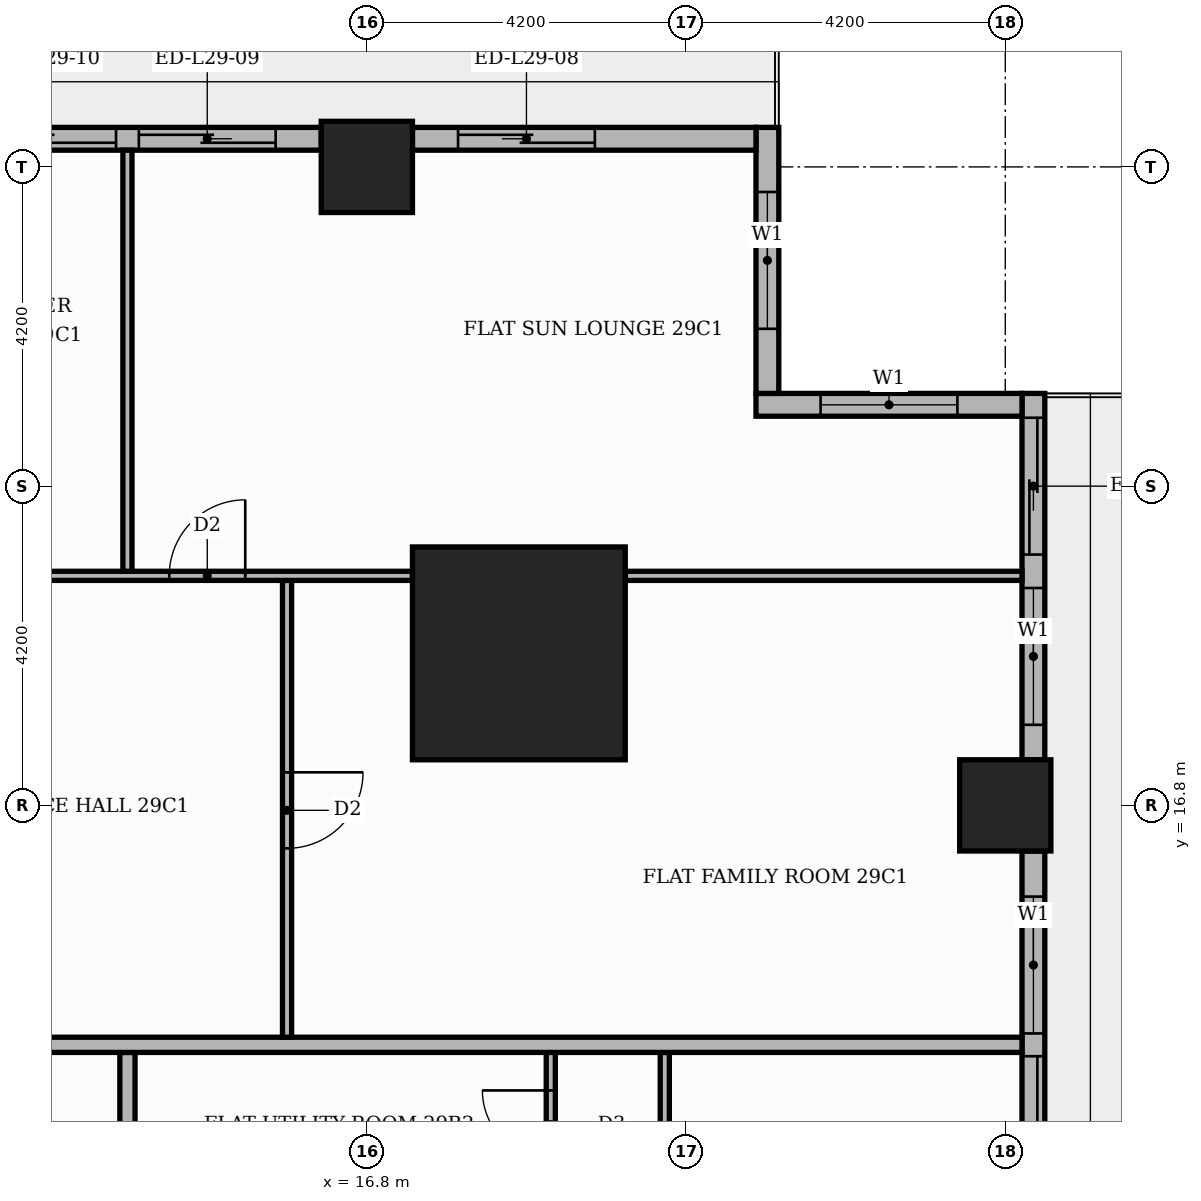
"""IFC4 building model, lengths in metres.
Left out: names, types, materials, properties, quantities, classifications, styles, units other than length and angle.
Written with IfcOpenShell. Run it as: python <this file> out.ifc"""

import sys

from ifc_helpers import new_model, si_unit, direction, frame, frame_2d, origin, origin_2d, place, context, subcontext, project, spatial, rectangle, extrude, element, fill, save


model = new_model("IFC4")
c1 = context("Model", 3, precision=1e-05, world=origin(), true_north=direction((0.0, 1.0)))
c2 = subcontext(c1, "Body", "Model", "MODEL_VIEW")
j1 = project(units=[si_unit("LENGTHUNIT", "METRE"), si_unit("PLANEANGLEUNIT", "RADIAN")], contexts=[c1])
p1 = place(None, origin())
s1 = spatial("IfcSite", under=j1, at=p1, CompositionType="ELEMENT")
p2 = place(p1, origin())
s2 = spatial("IfcBuilding", under=s1, at=p2, CompositionType="ELEMENT")
p3 = place(p2, frame((0.0, 0.0, 122.1)))
s3 = spatial("IfcBuildingStorey", under=s2, at=p3, CompositionType="ELEMENT", Elevation=122.1)
p4 = place(p3, frame((18.8, 18.8, 0.0), z_axis=(0.0, 0.0, 1.0), x_axis=(1.0, 0.0, 0.0)))
e1 = element("IfcColumn", 1, at=p4, inside=s3, PredefinedType="COLUMN", context=c2, shape_type="SweptSolid", body=[
    extrude(rectangle(XDim=2.8, YDim=2.8, at=origin_2d()), origin(), (0.0, 0.0, 1.0), 3.9),
])
for number, where, z_axis, x_axis in (
    (2, (25.2, 16.8, 0.0), (0.0, 0.0, 1.0), (1.0, 0.0, 0.0)),
    (3, (16.8, 25.2, 0.0), (0.0, 0.0, 1.0), (1.0, 0.0, 0.0)),
):
    element("IfcColumn", number, at=place(p3, frame(where, z_axis=z_axis, x_axis=x_axis)), inside=s3, PredefinedType="COLUMN", context=c2, shape_type="SweptSolid", body=[
        extrude(rectangle(XDim=1.2, YDim=1.2, at=origin_2d()), origin(), (0.0, 0.0, 1.0), 3.9),
    ])
p5 = place(p3, frame((25.57, 9.0, 0.0), z_axis=(0.0, 0.0, 1.0), x_axis=(0.0, 1.0, 0.0)))
e4 = element("IfcWall", 4, at=p5, inside=s3, PredefinedType="STANDARD", context=c2, shape_type="SweptSolid", body=[
    extrude(rectangle(XDim=7.2, YDim=0.3, at=frame_2d((3.6, 0.0))), origin(), (0.0, 0.0, 1.0), 3.4),
])
p6 = place(p5, frame((0.6, 0.0, 0.0)))
e5 = element("IfcOpeningElement", 5, at=p6, cuts=e4, PredefinedType="OPENING", context=c2, shape_type="SweptSolid", body=[
    extrude(rectangle(XDim=3.9, YDim=2.4, at=frame_2d((1.95, 1.2))), frame((0.0, 0.16, 0.0), z_axis=(0.0, -1.0, 0.0), x_axis=(1.0, 0.0, 0.0)), (0.0, 0.0, 1.0), 0.32),
])
p7 = place(p5, frame((4.8, 0.0, 0.9)))
e6 = element("IfcOpeningElement", 6, at=p7, cuts=e4, PredefinedType="OPENING", context=c2, shape_type="SweptSolid", body=[
    extrude(rectangle(XDim=1.8, YDim=2.1, at=frame_2d((0.9, 1.05))), frame((0.0, 0.16, 0.0), z_axis=(0.0, -1.0, 0.0), x_axis=(1.0, 0.0, 0.0)), (0.0, 0.0, 1.0), 0.32),
])
p8 = place(p3, frame((25.57, 17.4, 0.0), z_axis=(0.0, 0.0, 1.0), x_axis=(0.0, 1.0, 0.0)))
e7 = element("IfcWall", 7, at=p8, inside=s3, PredefinedType="STANDARD", context=c2, shape_type="SweptSolid", body=[
    extrude(rectangle(XDim=4.82, YDim=0.3, at=frame_2d((2.41, 0.0))), origin(), (0.0, 0.0, 1.0), 3.4),
])
p9 = place(p8, frame((2.7, 0.0, 0.0)))
e8 = element("IfcOpeningElement", 8, at=p9, cuts=e7, PredefinedType="OPENING", context=c2, shape_type="SweptSolid", body=[
    extrude(rectangle(XDim=1.8, YDim=2.4, at=frame_2d((0.9, 1.2))), frame((0.0, 0.16, 0.0), z_axis=(0.0, -1.0, 0.0), x_axis=(1.0, 0.0, 0.0)), (0.0, 0.0, 1.0), 0.32),
])
p10 = place(p8, frame((0.46, 0.0, 0.9)))
e9 = element("IfcOpeningElement", 9, at=p10, cuts=e7, PredefinedType="OPENING", context=c2, shape_type="SweptSolid", body=[
    extrude(rectangle(XDim=1.8, YDim=2.1, at=frame_2d((0.9, 1.05))), frame((0.0, 0.16, 0.0), z_axis=(0.0, -1.0, 0.0), x_axis=(1.0, 0.0, 0.0)), (0.0, 0.0, 1.0), 0.32),
])
p11 = place(p3, frame((25.42, 22.07, 0.0), z_axis=(0.0, 0.0, 1.0), x_axis=(-1.0, 0.0, 0.0)))
e10 = element("IfcWall", 10, at=p11, inside=s3, PredefinedType="STANDARD", context=c2, shape_type="SweptSolid", body=[
    extrude(rectangle(XDim=3.5, YDim=0.3, at=frame_2d((1.75, 0.0))), origin(), (0.0, 0.0, 1.0), 3.4),
])
p12 = place(p11, frame((0.85, 0.0, 0.9)))
e11 = element("IfcOpeningElement", 11, at=p12, cuts=e10, PredefinedType="OPENING", context=c2, shape_type="SweptSolid", body=[
    extrude(rectangle(XDim=1.8, YDim=2.1, at=frame_2d((0.9, 1.05))), frame((0.0, 0.16, 0.0), z_axis=(0.0, -1.0, 0.0), x_axis=(1.0, 0.0, 0.0)), (0.0, 0.0, 1.0), 0.32),
])
p13 = place(p3, frame((22.07, 22.22, 0.0), z_axis=(0.0, 0.0, 1.0), x_axis=(0.0, 1.0, 0.0)))
e12 = element("IfcWall", 12, at=p13, inside=s3, PredefinedType="STANDARD", context=c2, shape_type="SweptSolid", body=[
    extrude(rectangle(XDim=3.5, YDim=0.3, at=frame_2d((1.75, 0.0))), origin(), (0.0, 0.0, 1.0), 3.4),
])
p14 = place(p13, frame((0.85, 0.0, 0.9)))
e13 = element("IfcOpeningElement", 13, at=p14, cuts=e12, PredefinedType="OPENING", context=c2, shape_type="SweptSolid", body=[
    extrude(rectangle(XDim=1.8, YDim=2.1, at=frame_2d((0.9, 1.05))), frame((0.0, 0.16, 0.0), z_axis=(0.0, -1.0, 0.0), x_axis=(1.0, 0.0, 0.0)), (0.0, 0.0, 1.0), 0.32),
])
p15 = place(p3, frame((21.92, 25.57, 0.0), z_axis=(0.0, 0.0, 1.0), x_axis=(-1.0, 0.0, 0.0)))
e14 = element("IfcWall", 14, at=p15, inside=s3, PredefinedType="STANDARD", context=c2, shape_type="SweptSolid", body=[
    extrude(rectangle(XDim=4.52, YDim=0.3, at=frame_2d((2.26, 0.0))), origin(), (0.0, 0.0, 1.0), 3.4),
])
p16 = place(p15, frame((2.12, 0.0, 0.0)))
e15 = element("IfcOpeningElement", 15, at=p16, cuts=e14, PredefinedType="OPENING", context=c2, shape_type="SweptSolid", body=[
    extrude(rectangle(XDim=1.8, YDim=2.4, at=frame_2d((0.9, 1.2))), frame((0.0, 0.16, 0.0), z_axis=(0.0, -1.0, 0.0), x_axis=(1.0, 0.0, 0.0)), (0.0, 0.0, 1.0), 0.32),
])
p17 = place(p3, frame((16.2, 25.57, 0.0), z_axis=(0.0, 0.0, 1.0), x_axis=(-1.0, 0.0, 0.0)))
e16 = element("IfcWall", 16, at=p17, inside=s3, PredefinedType="STANDARD", context=c2, shape_type="SweptSolid", body=[
    extrude(rectangle(XDim=7.2, YDim=0.3, at=frame_2d((3.6, 0.0))), origin(), (0.0, 0.0, 1.0), 3.4),
])
p18 = place(p17, frame((0.6, 0.0, 0.0)))
e17 = element("IfcOpeningElement", 17, at=p18, cuts=e16, PredefinedType="OPENING", context=c2, shape_type="SweptSolid", body=[
    extrude(rectangle(XDim=1.8, YDim=2.4, at=frame_2d((0.9, 1.2))), frame((0.0, 0.16, 0.0), z_axis=(0.0, -1.0, 0.0), x_axis=(1.0, 0.0, 0.0)), (0.0, 0.0, 1.0), 0.32),
])
p19 = place(p17, frame((2.7, 0.0, 0.0)))
e18 = element("IfcOpeningElement", 18, at=p19, cuts=e16, PredefinedType="OPENING", context=c2, shape_type="SweptSolid", body=[
    extrude(rectangle(XDim=1.8, YDim=2.4, at=frame_2d((0.9, 1.2))), frame((0.0, 0.16, 0.0), z_axis=(0.0, -1.0, 0.0), x_axis=(1.0, 0.0, 0.0)), (0.0, 0.0, 1.0), 0.32),
])
p20 = place(p17, frame((4.8, 0.0, 0.9)))
e19 = element("IfcOpeningElement", 19, at=p20, cuts=e16, PredefinedType="OPENING", context=c2, shape_type="SweptSolid", body=[
    extrude(rectangle(XDim=1.8, YDim=2.1, at=frame_2d((0.9, 1.05))), frame((0.0, 0.16, 0.0), z_axis=(0.0, -1.0, 0.0), x_axis=(1.0, 0.0, 0.0)), (0.0, 0.0, 1.0), 0.32),
])
p21 = place(p3, frame((13.65, -5.15, 0.0), z_axis=(0.0, 0.0, 1.0), x_axis=(0.0, 1.0, 0.0)))
e20 = element("IfcWall", 20, at=p21, inside=s3, PredefinedType="PARTITIONING", context=c2, shape_type="SweptSolid", body=[
    extrude(rectangle(XDim=18.7, YDim=0.2, at=frame_2d((9.35, 0.0))), origin(), (0.0, 0.0, 1.0), 3.4),
])
p22 = place(p21, frame((5.65, 0.0, 0.0)))
e21 = element("IfcOpeningElement", 21, at=p22, cuts=e20, PredefinedType="OPENING", context=c2, shape_type="SweptSolid", body=[
    extrude(rectangle(XDim=1.1, YDim=2.4, at=frame_2d((0.55, 1.2))), frame((0.0, 0.11, 0.0), z_axis=(0.0, -1.0, 0.0), x_axis=(1.0, 0.0, 0.0)), (0.0, 0.0, 1.0), 0.22),
])
p23 = place(p3, frame((20.72, 7.41, 0.0), z_axis=(0.0, 0.0, 1.0), x_axis=(0.0, 1.0, 0.0)))
e22 = element("IfcWall", 22, at=p23, inside=s3, PredefinedType="PARTITIONING", context=c2, shape_type="SweptSolid", body=[
    extrude(rectangle(XDim=6.14, YDim=0.12, at=frame_2d((3.07, 0.0))), origin(), (0.0, 0.0, 1.0), 3.4),
])
p24 = place(p23, frame((2.59, 0.0, 0.0)))
e23 = element("IfcOpeningElement", 23, at=p24, cuts=e22, PredefinedType="OPENING", context=c2, shape_type="SweptSolid", body=[
    extrude(rectangle(XDim=1.0, YDim=2.1, at=frame_2d((0.5, 1.05))), frame((0.0, 0.07, 0.0), z_axis=(0.0, -1.0, 0.0), x_axis=(1.0, 0.0, 0.0)), (0.0, 0.0, 1.0), 0.14),
])
p25 = place(p3, frame((19.22, 11.61, 0.0), z_axis=(0.0, 0.0, 1.0), x_axis=(0.0, 1.0, 0.0)))
e24 = element("IfcWall", 24, at=p25, inside=s3, PredefinedType="PARTITIONING", context=c2, shape_type="SweptSolid", body=[
    extrude(rectangle(XDim=1.94, YDim=0.12, at=frame_2d((0.97, 0.0))), origin(), (0.0, 0.0, 1.0), 3.4),
])
p26 = place(p25, frame((0.54, 0.0, 0.0)))
e25 = element("IfcOpeningElement", 25, at=p26, cuts=e24, PredefinedType="OPENING", context=c2, shape_type="SweptSolid", body=[
    extrude(rectangle(XDim=0.9, YDim=2.1, at=frame_2d((0.45, 1.05))), frame((0.0, 0.07, 0.0), z_axis=(0.0, -1.0, 0.0), x_axis=(1.0, 0.0, 0.0)), (0.0, 0.0, 1.0), 0.14),
])
p27 = place(p3, frame((-13.65, 13.65, 0.0), z_axis=(0.0, 0.0, 1.0), x_axis=(1.0, 0.0, 0.0)))
e26 = element("IfcWall", 26, at=p27, inside=s3, PredefinedType="PARTITIONING", context=c2, shape_type="SweptSolid", body=[
    extrude(rectangle(XDim=39.07, YDim=0.2, at=frame_2d((19.535, 0.0))), origin(), (0.0, 0.0, 1.0), 3.4),
])
p28 = place(p27, frame((24.65, 0.0, 0.0)))
e27 = element("IfcOpeningElement", 27, at=p28, cuts=e26, PredefinedType="OPENING", context=c2, shape_type="SweptSolid", body=[
    extrude(rectangle(XDim=1.1, YDim=2.4, at=frame_2d((0.55, 1.2))), frame((0.0, 0.11, 0.0), z_axis=(0.0, -1.0, 0.0), x_axis=(1.0, 0.0, 0.0)), (0.0, 0.0, 1.0), 0.22),
])
p29 = place(p27, frame((12.05, 0.0, 0.0)))
e28 = element("IfcOpeningElement", 28, at=p29, cuts=e26, PredefinedType="OPENING", context=c2, shape_type="SweptSolid", body=[
    extrude(rectangle(XDim=1.1, YDim=2.4, at=frame_2d((0.55, 1.2))), frame((0.0, 0.11, 0.0), z_axis=(0.0, -1.0, 0.0), x_axis=(1.0, 0.0, 0.0)), (0.0, 0.0, 1.0), 0.22),
])
p30 = place(p3, frame((15.75, 13.75, 0.0), z_axis=(0.0, 0.0, 1.0), x_axis=(0.0, 1.0, 0.0)))
e29 = element("IfcWall", 29, at=p30, inside=s3, PredefinedType="PARTITIONING", context=c2, shape_type="SweptSolid", body=[
    extrude(rectangle(XDim=6.01, YDim=0.12, at=frame_2d((3.005, 0.0))), origin(), (0.0, 0.0, 1.0), 3.4),
])
p31 = place(p30, frame((2.485, 0.0, 0.0)))
e30 = element("IfcOpeningElement", 30, at=p31, cuts=e29, PredefinedType="OPENING", context=c2, shape_type="SweptSolid", body=[
    extrude(rectangle(XDim=1.0, YDim=2.1, at=frame_2d((0.5, 1.05))), frame((0.0, 0.07, 0.0), z_axis=(0.0, -1.0, 0.0), x_axis=(1.0, 0.0, 0.0)), (0.0, 0.0, 1.0), 0.14),
])
p32 = place(p3, frame((5.35, 19.82, 0.0), z_axis=(0.0, 0.0, 1.0), x_axis=(1.0, 0.0, 0.0)))
e31 = element("IfcWall", 31, at=p32, inside=s3, PredefinedType="PARTITIONING", context=c2, shape_type="SweptSolid", body=[
    extrude(rectangle(XDim=12.05, YDim=0.12, at=frame_2d((6.025, 0.0))), origin(), (0.0, 0.0, 1.0), 3.4),
])
p33 = place(p32, frame((8.85, 0.0, 0.0)))
e32 = element("IfcOpeningElement", 32, at=p33, cuts=e31, PredefinedType="OPENING", context=c2, shape_type="SweptSolid", body=[
    extrude(rectangle(XDim=1.0, YDim=2.1, at=frame_2d((0.5, 1.05))), frame((0.0, 0.07, 0.0), z_axis=(0.0, -1.0, 0.0), x_axis=(1.0, 0.0, 0.0)), (0.0, 0.0, 1.0), 0.14),
])
p34 = place(p32, frame((5.75, 0.0, 0.0)))
e33 = element("IfcOpeningElement", 33, at=p34, cuts=e31, PredefinedType="OPENING", context=c2, shape_type="SweptSolid", body=[
    extrude(rectangle(XDim=0.9, YDim=2.1, at=frame_2d((0.45, 1.05))), frame((0.0, 0.07, 0.0), z_axis=(0.0, -1.0, 0.0), x_axis=(1.0, 0.0, 0.0)), (0.0, 0.0, 1.0), 0.14),
])
p35 = place(p3, frame((20.2, 19.82, 0.0), z_axis=(0.0, 0.0, 1.0), x_axis=(1.0, 0.0, 0.0)))
e34 = element("IfcWall", 34, at=p35, inside=s3, PredefinedType="PARTITIONING", context=c2, shape_type="SweptSolid", body=[
    extrude(rectangle(XDim=5.22, YDim=0.12, at=frame_2d((2.61, 0.0))), origin(), (0.0, 0.0, 1.0), 3.4),
])
p36 = place(p3, frame((13.65, 19.88, 0.0), z_axis=(0.0, 0.0, 1.0), x_axis=(0.0, 1.0, 0.0)))
e35 = element("IfcWall", 35, at=p36, inside=s3, PredefinedType="PARTITIONING", context=c2, shape_type="SweptSolid", body=[
    extrude(rectangle(XDim=5.54, YDim=0.12, at=frame_2d((2.77, 0.0))), origin(), (0.0, 0.0, 1.0), 3.4),
])
p37 = place(p6, origin())
e36 = element("IfcDoor", 36, at=p37, inside=s3, OperationType="SLIDING_TO_LEFT", PredefinedType="DOOR", context=c2, shape_type="SweptSolid", body=[
    extrude(rectangle(XDim=3.9, YDim=2.4, at=frame_2d((1.95, 1.2))), frame((0.0, 0.025, 0.0), z_axis=(0.0, -1.0, 0.0), x_axis=(1.0, 0.0, 0.0)), (0.0, 0.0, 1.0), 0.05),
])
fill(e5, e36)
p38 = place(p7, origin())
e37 = element("IfcWindow", 37, at=p38, inside=s3, PartitioningType="SINGLE_PANEL", PredefinedType="WINDOW", context=c2, shape_type="SweptSolid", body=[
    extrude(rectangle(XDim=1.8, YDim=2.1, at=frame_2d((0.9, 1.05))), frame((0.0, 0.03, 0.0), z_axis=(0.0, -1.0, 0.0), x_axis=(1.0, 0.0, 0.0)), (0.0, 0.0, 1.0), 0.06),
])
fill(e6, e37)
p39 = place(p9, origin())
e38 = element("IfcDoor", 38, at=p39, inside=s3, OperationType="SLIDING_TO_LEFT", PredefinedType="DOOR", context=c2, shape_type="SweptSolid", body=[
    extrude(rectangle(XDim=1.8, YDim=2.4, at=frame_2d((0.9, 1.2))), frame((0.0, 0.025, 0.0), z_axis=(0.0, -1.0, 0.0), x_axis=(1.0, 0.0, 0.0)), (0.0, 0.0, 1.0), 0.05),
])
fill(e8, e38)
p40 = place(p10, origin())
e39 = element("IfcWindow", 39, at=p40, inside=s3, PartitioningType="SINGLE_PANEL", PredefinedType="WINDOW", context=c2, shape_type="SweptSolid", body=[
    extrude(rectangle(XDim=1.8, YDim=2.1, at=frame_2d((0.9, 1.05))), frame((0.0, 0.03, 0.0), z_axis=(0.0, -1.0, 0.0), x_axis=(1.0, 0.0, 0.0)), (0.0, 0.0, 1.0), 0.06),
])
fill(e9, e39)
p41 = place(p12, origin())
e40 = element("IfcWindow", 40, at=p41, inside=s3, PartitioningType="SINGLE_PANEL", PredefinedType="WINDOW", context=c2, shape_type="SweptSolid", body=[
    extrude(rectangle(XDim=1.8, YDim=2.1, at=frame_2d((0.9, 1.05))), frame((0.0, 0.03, 0.0), z_axis=(0.0, -1.0, 0.0), x_axis=(1.0, 0.0, 0.0)), (0.0, 0.0, 1.0), 0.06),
])
fill(e11, e40)
p42 = place(p14, origin())
e41 = element("IfcWindow", 41, at=p42, inside=s3, PartitioningType="SINGLE_PANEL", PredefinedType="WINDOW", context=c2, shape_type="SweptSolid", body=[
    extrude(rectangle(XDim=1.8, YDim=2.1, at=frame_2d((0.9, 1.05))), frame((0.0, 0.03, 0.0), z_axis=(0.0, -1.0, 0.0), x_axis=(1.0, 0.0, 0.0)), (0.0, 0.0, 1.0), 0.06),
])
fill(e13, e41)
p43 = place(p16, origin())
e42 = element("IfcDoor", 42, at=p43, inside=s3, OperationType="SLIDING_TO_RIGHT", PredefinedType="DOOR", context=c2, shape_type="SweptSolid", body=[
    extrude(rectangle(XDim=1.8, YDim=2.4, at=frame_2d((0.9, 1.2))), frame((0.0, 0.025, 0.0), z_axis=(0.0, -1.0, 0.0), x_axis=(1.0, 0.0, 0.0)), (0.0, 0.0, 1.0), 0.05),
])
fill(e15, e42)
p44 = place(p18, origin())
e43 = element("IfcDoor", 43, at=p44, inside=s3, OperationType="SLIDING_TO_LEFT", PredefinedType="DOOR", context=c2, shape_type="SweptSolid", body=[
    extrude(rectangle(XDim=1.8, YDim=2.4, at=frame_2d((0.9, 1.2))), frame((0.0, 0.025, 0.0), z_axis=(0.0, -1.0, 0.0), x_axis=(1.0, 0.0, 0.0)), (0.0, 0.0, 1.0), 0.05),
])
fill(e17, e43)
p45 = place(p19, origin())
e44 = element("IfcDoor", 44, at=p45, inside=s3, OperationType="SLIDING_TO_RIGHT", PredefinedType="DOOR", context=c2, shape_type="SweptSolid", body=[
    extrude(rectangle(XDim=1.8, YDim=2.4, at=frame_2d((0.9, 1.2))), frame((0.0, 0.025, 0.0), z_axis=(0.0, -1.0, 0.0), x_axis=(1.0, 0.0, 0.0)), (0.0, 0.0, 1.0), 0.05),
])
fill(e18, e44)
p46 = place(p26, origin())
e45 = element("IfcDoor", 45, at=p46, inside=s3, OperationType="SINGLE_SWING_RIGHT", PredefinedType="DOOR", context=c2, shape_type="SweptSolid", body=[
    extrude(rectangle(XDim=0.9, YDim=2.1, at=frame_2d((0.45, 1.05))), frame((0.0, 0.025, 0.0), z_axis=(0.0, -1.0, 0.0), x_axis=(1.0, 0.0, 0.0)), (0.0, 0.0, 1.0), 0.05),
])
fill(e25, e45)
p47 = place(p31, frame((1.0, 0.0, 0.0), z_axis=(0.0, 0.0, 1.0), x_axis=(-1.0, 0.0, 0.0)))
e46 = element("IfcDoor", 46, at=p47, inside=s3, OperationType="SINGLE_SWING_RIGHT", PredefinedType="DOOR", context=c2, shape_type="SweptSolid", body=[
    extrude(rectangle(XDim=1.0, YDim=2.1, at=frame_2d((0.5, 1.05))), frame((0.0, 0.025, 0.0), z_axis=(0.0, -1.0, 0.0), x_axis=(1.0, 0.0, 0.0)), (0.0, 0.0, 1.0), 0.05),
])
fill(e30, e46)
p48 = place(p33, origin())
e47 = element("IfcDoor", 47, at=p48, inside=s3, OperationType="SINGLE_SWING_RIGHT", PredefinedType="DOOR", context=c2, shape_type="SweptSolid", body=[
    extrude(rectangle(XDim=1.0, YDim=2.1, at=frame_2d((0.5, 1.05))), frame((0.0, 0.025, 0.0), z_axis=(0.0, -1.0, 0.0), x_axis=(1.0, 0.0, 0.0)), (0.0, 0.0, 1.0), 0.05),
])
fill(e32, e47)
save(model, sys.argv[1])
